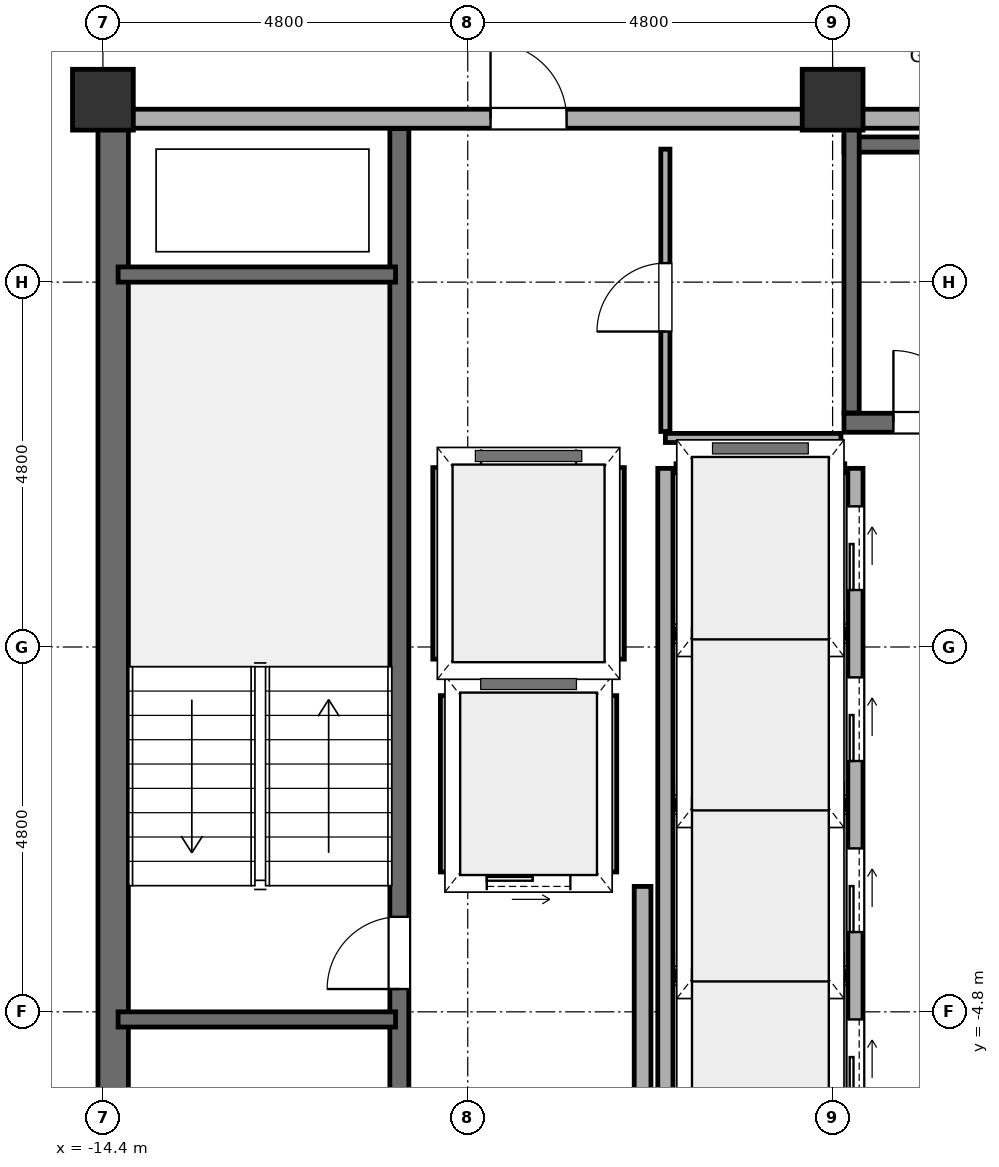
"""IFC4 building model, lengths in metres.
Left out: names, types, materials, properties, quantities, classifications, styles, units other than length and angle.
Written with IfcOpenShell. Run it as: python <this file> out.ifc"""

import sys

from ifc_helpers import new_model, si_unit, direction, frame, frame_2d, origin, origin_2d, place, context, subcontext, project, spatial, rectangle, hollow_rectangle, extrude, element, fill, save


model = new_model("IFC4")
c1 = context("Model", 3, precision=1e-05, world=origin(), true_north=direction((0.0, 1.0)))
c2 = subcontext(c1, "Body", "Model", "MODEL_VIEW")
j1 = project(units=[si_unit("LENGTHUNIT", "METRE"), si_unit("PLANEANGLEUNIT", "RADIAN")], contexts=[c1])
p1 = place(None, origin())
s1 = spatial("IfcSite", under=j1, at=p1, CompositionType="ELEMENT")
p2 = place(p1, origin())
s2 = spatial("IfcBuilding", under=s1, at=p2, CompositionType="ELEMENT")
p3 = place(p2, frame((0.0, 0.0, 30.0)))
s3 = spatial("IfcBuildingStorey", under=s2, at=p3, CompositionType="ELEMENT", Elevation=30.0)
for number, where, z_axis, x_axis in (
    (1, (-14.4, 7.2, 0.0), (0.0, 0.0, 1.0), (1.0, 0.0, 0.0)),
    (2, (-4.8, 7.2, 0.0), (0.0, 0.0, 1.0), (1.0, 0.0, 0.0)),
):
    element("IfcColumn", number, at=place(p3, frame(where, z_axis=z_axis, x_axis=x_axis)), inside=s3, PredefinedType="COLUMN", context=c2, shape_type="SweptSolid", body=[
        extrude(hollow_rectangle(XDim=0.8, YDim=0.8, WallThickness=0.036, at=origin_2d()), origin(), (0.0, 0.0, 1.0), 3.7),
    ])
p4 = place(p3, frame((-14.265, -7.2, -0.18), z_axis=(0.0, 0.0, 1.0), x_axis=(0.0, 1.0, 0.0)))
e3 = element("IfcWall", 3, at=p4, inside=s3, PredefinedType="SHEAR", context=c2, shape_type="SweptSolid", body=[
    extrude(rectangle(XDim=14.4, YDim=0.4, at=frame_2d((7.2, 0.0))), origin(), (0.0, 0.0, 1.0), 3.7),
])
p5 = place(p3, frame((-14.2, 6.95, 0.0), z_axis=(0.0, 0.0, 1.0), x_axis=(1.0, 0.0, 0.0)))
e4 = element("IfcWall", 4, at=p5, inside=s3, PredefinedType="SOLIDWALL", context=c2, shape_type="SweptSolid", body=[
    extrude(rectangle(XDim=9.4, YDim=0.25, at=frame_2d((4.7, 0.0))), origin(), (0.0, 0.0, 1.0), 2.12),
])
p6 = place(p5, frame((4.9, 0.0, 0.0)))
e5 = element("IfcOpeningElement", 5, at=p6, cuts=e4, PredefinedType="OPENING", context=c2, shape_type="SweptSolid", body=[
    extrude(rectangle(XDim=1.0, YDim=2.02, at=frame_2d((0.5, 1.01))), frame((0.0, 0.14, 0.0), z_axis=(0.0, -1.0, 0.0), x_axis=(1.0, 0.0, 0.0)), (0.0, 0.0, 1.0), 0.28),
])
p7 = place(p3, frame((-4.6, 6.95, 0.0), z_axis=(0.0, 0.0, 1.0), x_axis=(1.0, 0.0, 0.0)))
e6 = element("IfcWall", 6, at=p7, inside=s3, PredefinedType="SOLIDWALL", context=c2, shape_type="SweptSolid", body=[
    extrude(rectangle(XDim=9.2, YDim=0.25, at=frame_2d((4.6, 0.0))), origin(), (0.0, 0.0, 1.0), 2.12),
])
p8 = place(p3, frame((-7.3, -6.82, 0.0), z_axis=(0.0, 0.0, 1.0), x_axis=(0.0, 1.0, 0.0)))
e7 = element("IfcWall", 7, at=p8, inside=s3, PredefinedType="SOLIDWALL", context=c2, shape_type="SweptSolid", body=[
    extrude(rectangle(XDim=3.67, YDim=0.22, at=frame_2d((1.835, 0.0))), origin(), (0.0, 0.0, 1.0), 2.12),
])
p9 = place(p3, frame((-10.5, -6.82, -0.18), z_axis=(0.0, 0.0, 1.0), x_axis=(0.0, 1.0, 0.0)))
e8 = element("IfcWall", 8, at=p9, inside=s3, PredefinedType="SOLIDWALL", context=c2, shape_type="SweptSolid", body=[
    extrude(rectangle(XDim=13.64, YDim=0.25, at=frame_2d((6.82, 0.0))), origin(), (0.0, 0.0, 1.0), 3.7),
])
p10 = place(p9, frame((2.32, 0.0, 0.18)))
e9 = element("IfcOpeningElement", 9, at=p10, cuts=e8, PredefinedType="OPENING", context=c2, shape_type="SweptSolid", body=[
    extrude(rectangle(XDim=0.95, YDim=2.15, at=frame_2d((0.475, 1.075))), frame((0.0, 0.14, 0.0), z_axis=(0.0, -1.0, 0.0), x_axis=(1.0, 0.0, 0.0)), (0.0, 0.0, 1.0), 0.28),
])
for number, where, z_axis, x_axis in (
    (10, (-14.2, -4.9, -0.18), (0.0, 0.0, 1.0), (1.0, 0.0, 0.0)),
    (11, (-14.2, 4.9, -0.18), (0.0, 0.0, 1.0), (1.0, 0.0, 0.0)),
):
    element("IfcWall", number, at=place(p3, frame(where, z_axis=z_axis, x_axis=x_axis)), inside=s3, PredefinedType="SOLIDWALL", context=c2, shape_type="SweptSolid", body=[
        extrude(rectangle(XDim=3.65, YDim=0.2, at=frame_2d((1.825, 0.0))), origin(), (0.0, 0.0, 1.0), 3.7),
    ])
p11 = place(p3, frame((-4.65, 2.95, -0.18), z_axis=(0.0, 0.0, 1.0), x_axis=(1.0, 0.0, 0.0)))
e12 = element("IfcWall", 12, at=p11, inside=s3, PredefinedType="SOLIDWALL", context=c2, shape_type="SweptSolid", body=[
    extrude(rectangle(XDim=9.9, YDim=0.25, at=frame_2d((4.95, 0.0))), origin(), (0.0, 0.0, 1.0), 3.7),
])
p12 = place(p11, frame((0.65, 0.0, 0.18)))
e13 = element("IfcOpeningElement", 13, at=p12, cuts=e12, PredefinedType="OPENING", context=c2, shape_type="SweptSolid", body=[
    extrude(rectangle(XDim=0.95, YDim=2.15, at=frame_2d((0.475, 1.075))), frame((0.0, 0.14, 0.0), z_axis=(0.0, -1.0, 0.0), x_axis=(1.0, 0.0, 0.0)), (0.0, 0.0, 1.0), 0.28),
])
p13 = place(p3, frame((-4.65, 6.61, -0.18), z_axis=(0.0, 0.0, 1.0), x_axis=(1.0, 0.0, 0.0)))
e14 = element("IfcWall", 14, at=p13, inside=s3, PredefinedType="SOLIDWALL", context=c2, shape_type="SweptSolid", body=[
    extrude(rectangle(XDim=9.9, YDim=0.2, at=frame_2d((4.95, 0.0))), origin(), (0.0, 0.0, 1.0), 3.7),
])
p14 = place(p3, frame((-4.55, 3.08, -0.18), z_axis=(0.0, 0.0, 1.0), x_axis=(0.0, 1.0, 0.0)))
e15 = element("IfcWall", 15, at=p14, inside=s3, PredefinedType="SOLIDWALL", context=c2, shape_type="SweptSolid", body=[
    extrude(rectangle(XDim=3.74, YDim=0.2, at=frame_2d((1.87, 0.0))), origin(), (0.0, 0.0, 1.0), 3.7),
])
p15 = place(p3, frame((-4.5, -6.5, 0.0), z_axis=(0.0, 0.0, 1.0), x_axis=(0.0, 1.0, 0.0)))
e16 = element("IfcWall", 16, at=p15, inside=s3, PredefinedType="SOLIDWALL", context=c2, shape_type="SweptSolid", body=[
    extrude(rectangle(XDim=8.85, YDim=0.2, at=frame_2d((4.425, 0.0))), origin(), (0.0, 0.0, 1.0), 3.52),
])
p16 = place(p15, frame((0.5, 0.0, 0.0)))
e17 = element("IfcOpeningElement", 17, at=p16, cuts=e16, PredefinedType="OPENING", context=c2, shape_type="SweptSolid", body=[
    extrude(rectangle(XDim=1.1, YDim=2.2, at=frame_2d((0.55, 1.1))), frame((0.0, 0.115, 0.0), z_axis=(0.0, -1.0, 0.0), x_axis=(1.0, 0.0, 0.0)), (0.0, 0.0, 1.0), 0.23),
])
p17 = place(p15, frame((2.75, 0.0, 0.0)))
e18 = element("IfcOpeningElement", 18, at=p17, cuts=e16, PredefinedType="OPENING", context=c2, shape_type="SweptSolid", body=[
    extrude(rectangle(XDim=1.1, YDim=2.2, at=frame_2d((0.55, 1.1))), frame((0.0, 0.115, 0.0), z_axis=(0.0, -1.0, 0.0), x_axis=(1.0, 0.0, 0.0)), (0.0, 0.0, 1.0), 0.23),
])
p18 = place(p15, frame((5.0, 0.0, 0.0)))
e19 = element("IfcOpeningElement", 19, at=p18, cuts=e16, PredefinedType="OPENING", context=c2, shape_type="SweptSolid", body=[
    extrude(rectangle(XDim=1.1, YDim=2.2, at=frame_2d((0.55, 1.1))), frame((0.0, 0.115, 0.0), z_axis=(0.0, -1.0, 0.0), x_axis=(1.0, 0.0, 0.0)), (0.0, 0.0, 1.0), 0.23),
])
p19 = place(p15, frame((7.25, 0.0, 0.0)))
e20 = element("IfcOpeningElement", 20, at=p19, cuts=e16, PredefinedType="OPENING", context=c2, shape_type="SweptSolid", body=[
    extrude(rectangle(XDim=1.1, YDim=2.2, at=frame_2d((0.55, 1.1))), frame((0.0, 0.115, 0.0), z_axis=(0.0, -1.0, 0.0), x_axis=(1.0, 0.0, 0.0)), (0.0, 0.0, 1.0), 0.23),
])
p20 = place(p3, frame((-7.0, -6.5, 0.0), z_axis=(0.0, 0.0, 1.0), x_axis=(0.0, 1.0, 0.0)))
e21 = element("IfcWall", 21, at=p20, inside=s3, PredefinedType="SOLIDWALL", context=c2, shape_type="SweptSolid", body=[
    extrude(rectangle(XDim=8.85, YDim=0.2, at=frame_2d((4.425, 0.0))), origin(), (0.0, 0.0, 1.0), 3.52),
])
for number, where, z_axis, x_axis in (
    (22, (-6.86, -4.325, 0.0), (0.0, 0.0, 1.0), (1.0, 0.0, 0.0)),
    (23, (-6.86, -2.075, 0.0), (0.0, 0.0, 1.0), (1.0, 0.0, 0.0)),
    (24, (-6.86, 0.175, 0.0), (0.0, 0.0, 1.0), (1.0, 0.0, 0.0)),
    (25, (-6.86, 2.35, 0.0), (0.0, 0.0, 1.0), (1.0, 0.0, 0.0)),
):
    element("IfcWall", number, at=place(p3, frame(where, z_axis=z_axis, x_axis=x_axis)), inside=s3, PredefinedType="PARTITIONING", context=c2, shape_type="SweptSolid", body=[
        extrude(rectangle(XDim=2.22, YDim=0.12, at=frame_2d((1.11, 0.0))), origin(), (0.0, 0.0, 1.0), 3.52),
    ])
p21 = place(p3, frame((-9.82, -3.1, 0.0), z_axis=(0.0, 0.0, 1.0), x_axis=(1.0, 0.0, 0.0)))
e26 = element("IfcWall", 26, at=p21, inside=s3, PredefinedType="SOLIDWALL", context=c2, shape_type="SweptSolid", body=[
    extrude(rectangle(XDim=2.04, YDim=0.2, at=frame_2d((1.02, 0.0))), origin(), (0.0, 0.0, 1.0), 3.52),
])
p22 = place(p21, frame((0.47, 0.0, 0.0)))
e27 = element("IfcOpeningElement", 27, at=p22, cuts=e26, PredefinedType="OPENING", context=c2, shape_type="SweptSolid", body=[
    extrude(rectangle(XDim=1.1, YDim=2.2, at=frame_2d((0.55, 1.1))), frame((0.0, 0.115, 0.0), z_axis=(0.0, -1.0, 0.0), x_axis=(1.0, 0.0, 0.0)), (0.0, 0.0, 1.0), 0.23),
])
p23 = place(p3, frame((-9.82, -0.5, 0.0), z_axis=(0.0, 0.0, 1.0), x_axis=(1.0, 0.0, 0.0)))
e28 = element("IfcWall", 28, at=p23, inside=s3, PredefinedType="SOLIDWALL", context=c2, shape_type="SweptSolid", body=[
    extrude(rectangle(XDim=2.04, YDim=0.2, at=frame_2d((1.02, 0.0))), origin(), (0.0, 0.0, 1.0), 3.52),
])
for number, where, z_axis, x_axis in (
    (29, (-9.9, -2.96, 0.0), (0.0, 0.0, 1.0), (0.0, 1.0, 0.0)),
    (30, (-7.7, -2.96, 0.0), (0.0, 0.0, 1.0), (0.0, 1.0, 0.0)),
):
    element("IfcWall", number, at=place(p3, frame(where, z_axis=z_axis, x_axis=x_axis)), inside=s3, PredefinedType="PARTITIONING", context=c2, shape_type="SweptSolid", body=[
        extrude(rectangle(XDim=2.32, YDim=0.12, at=frame_2d((1.16, 0.0))), origin(), (0.0, 0.0, 1.0), 3.52),
    ])
p24 = place(p3, frame((-9.92, 2.5, 0.0), z_axis=(0.0, 0.0, 1.0), x_axis=(1.0, 0.0, 0.0)))
e31 = element("IfcWall", 31, at=p24, inside=s3, PredefinedType="SOLIDWALL", context=c2, shape_type="SweptSolid", body=[
    extrude(rectangle(XDim=2.24, YDim=0.2, at=frame_2d((1.12, 0.0))), origin(), (0.0, 0.0, 1.0), 3.52),
])
p25 = place(p24, frame((0.495, 0.0, 0.0)))
e32 = element("IfcOpeningElement", 32, at=p25, cuts=e31, PredefinedType="OPENING", context=c2, shape_type="SweptSolid", body=[
    extrude(rectangle(XDim=1.25, YDim=2.25, at=frame_2d((0.625, 1.125))), frame((0.0, 0.115, 0.0), z_axis=(0.0, -1.0, 0.0), x_axis=(1.0, 0.0, 0.0)), (0.0, 0.0, 1.0), 0.23),
])
p26 = place(p3, frame((-9.92, -0.3, 0.0), z_axis=(0.0, 0.0, 1.0), x_axis=(1.0, 0.0, 0.0)))
e33 = element("IfcWall", 33, at=p26, inside=s3, PredefinedType="SOLIDWALL", context=c2, shape_type="SweptSolid", body=[
    extrude(rectangle(XDim=2.24, YDim=0.2, at=frame_2d((1.12, 0.0))), origin(), (0.0, 0.0, 1.0), 3.52),
])
for number, where, z_axis, x_axis in (
    (34, (-10.0, -0.16, 0.0), (0.0, 0.0, 1.0), (0.0, 1.0, 0.0)),
    (35, (-7.6, -0.16, 0.0), (0.0, 0.0, 1.0), (0.0, 1.0, 0.0)),
):
    element("IfcWall", number, at=place(p3, frame(where, z_axis=z_axis, x_axis=x_axis)), inside=s3, PredefinedType="PARTITIONING", context=c2, shape_type="SweptSolid", body=[
        extrude(rectangle(XDim=2.52, YDim=0.12, at=frame_2d((1.26, 0.0))), origin(), (0.0, 0.0, 1.0), 3.52),
    ])
p27 = place(p3, frame((-7.0, 2.75, 0.0), z_axis=(0.0, 0.0, 1.0), x_axis=(1.0, 0.0, 0.0)))
e36 = element("IfcWall", 36, at=p27, inside=s3, PredefinedType="PARTITIONING", context=c2, shape_type="SweptSolid", body=[
    extrude(rectangle(XDim=2.31, YDim=0.12, at=frame_2d((1.155, 0.0))), origin(), (0.0, 0.0, 1.0), 3.52),
])
p28 = place(p3, frame((-7.0, 2.835, 0.0), z_axis=(0.0, 0.0, 1.0), x_axis=(0.0, 1.0, 0.0)))
e37 = element("IfcWall", 37, at=p28, inside=s3, PredefinedType="PARTITIONING", context=c2, shape_type="SweptSolid", body=[
    extrude(rectangle(XDim=3.715, YDim=0.12, at=frame_2d((1.857, 0.0))), origin(), (0.0, 0.0, 1.0), 3.52),
])
p29 = place(p28, frame((1.315, 0.0, 0.0)))
e38 = element("IfcOpeningElement", 38, at=p29, cuts=e37, PredefinedType="OPENING", context=c2, shape_type="SweptSolid", body=[
    extrude(rectangle(XDim=0.9, YDim=2.1, at=frame_2d((0.45, 1.05))), frame((0.0, 0.075, 0.0), z_axis=(0.0, -1.0, 0.0), x_axis=(1.0, 0.0, 0.0)), (0.0, 0.0, 1.0), 0.15),
])
p30 = place(p6, origin())
e39 = element("IfcDoor", 39, at=p30, inside=s3, OperationType="SINGLE_SWING_RIGHT", PredefinedType="DOOR", context=c2, shape_type="SweptSolid", body=[
    extrude(rectangle(XDim=1.0, YDim=2.02, at=frame_2d((0.5, 1.01))), frame((0.0, 0.025, 0.0), z_axis=(0.0, -1.0, 0.0), x_axis=(1.0, 0.0, 0.0)), (0.0, 0.0, 1.0), 0.05),
])
fill(e5, e39)
p31 = place(p10, origin())
e40 = element("IfcDoor", 40, at=p31, inside=s3, OperationType="SINGLE_SWING_RIGHT", PredefinedType="DOOR", context=c2, shape_type="SweptSolid", body=[
    extrude(rectangle(XDim=0.95, YDim=2.15, at=frame_2d((0.475, 1.075))), frame((0.0, 0.025, 0.0), z_axis=(0.0, -1.0, 0.0), x_axis=(1.0, 0.0, 0.0)), (0.0, 0.0, 1.0), 0.05),
])
fill(e9, e40)
p32 = place(p12, origin())
e41 = element("IfcDoor", 41, at=p32, inside=s3, OperationType="SINGLE_SWING_LEFT", PredefinedType="DOOR", context=c2, shape_type="SweptSolid", body=[
    extrude(rectangle(XDim=0.95, YDim=2.15, at=frame_2d((0.475, 1.075))), frame((0.0, 0.025, 0.0), z_axis=(0.0, -1.0, 0.0), x_axis=(1.0, 0.0, 0.0)), (0.0, 0.0, 1.0), 0.05),
])
fill(e13, e41)
p33 = place(p16, origin())
e42 = element("IfcDoor", 42, at=p33, inside=s3, OperationType="SLIDING_TO_LEFT", PredefinedType="DOOR", context=c2, shape_type="SweptSolid", body=[
    extrude(rectangle(XDim=1.1, YDim=2.2, at=frame_2d((0.55, 1.1))), frame((0.0, 0.025, 0.0), z_axis=(0.0, -1.0, 0.0), x_axis=(1.0, 0.0, 0.0)), (0.0, 0.0, 1.0), 0.05),
])
fill(e17, e42)
p34 = place(p17, origin())
e43 = element("IfcDoor", 43, at=p34, inside=s3, OperationType="SLIDING_TO_LEFT", PredefinedType="DOOR", context=c2, shape_type="SweptSolid", body=[
    extrude(rectangle(XDim=1.1, YDim=2.2, at=frame_2d((0.55, 1.1))), frame((0.0, 0.025, 0.0), z_axis=(0.0, -1.0, 0.0), x_axis=(1.0, 0.0, 0.0)), (0.0, 0.0, 1.0), 0.05),
])
fill(e18, e43)
p35 = place(p18, origin())
e44 = element("IfcDoor", 44, at=p35, inside=s3, OperationType="SLIDING_TO_LEFT", PredefinedType="DOOR", context=c2, shape_type="SweptSolid", body=[
    extrude(rectangle(XDim=1.1, YDim=2.2, at=frame_2d((0.55, 1.1))), frame((0.0, 0.025, 0.0), z_axis=(0.0, -1.0, 0.0), x_axis=(1.0, 0.0, 0.0)), (0.0, 0.0, 1.0), 0.05),
])
fill(e19, e44)
p36 = place(p19, origin())
e45 = element("IfcDoor", 45, at=p36, inside=s3, OperationType="SLIDING_TO_LEFT", PredefinedType="DOOR", context=c2, shape_type="SweptSolid", body=[
    extrude(rectangle(XDim=1.1, YDim=2.2, at=frame_2d((0.55, 1.1))), frame((0.0, 0.025, 0.0), z_axis=(0.0, -1.0, 0.0), x_axis=(1.0, 0.0, 0.0)), (0.0, 0.0, 1.0), 0.05),
])
fill(e20, e45)
p37 = place(p22, origin())
e46 = element("IfcDoor", 46, at=p37, inside=s3, OperationType="SLIDING_TO_LEFT", PredefinedType="DOOR", context=c2, shape_type="SweptSolid", body=[
    extrude(rectangle(XDim=1.1, YDim=2.2, at=frame_2d((0.55, 1.1))), frame((0.0, 0.025, 0.0), z_axis=(0.0, -1.0, 0.0), x_axis=(1.0, 0.0, 0.0)), (0.0, 0.0, 1.0), 0.05),
])
fill(e27, e46)
p38 = place(p25, origin())
e47 = element("IfcDoor", 47, at=p38, inside=s3, OperationType="SLIDING_TO_LEFT", PredefinedType="DOOR", context=c2, shape_type="SweptSolid", body=[
    extrude(rectangle(XDim=1.25, YDim=2.25, at=frame_2d((0.625, 1.125))), frame((0.0, 0.025, 0.0), z_axis=(0.0, -1.0, 0.0), x_axis=(1.0, 0.0, 0.0)), (0.0, 0.0, 1.0), 0.05),
])
fill(e32, e47)
p39 = place(p29, origin())
e48 = element("IfcDoor", 48, at=p39, inside=s3, OperationType="SINGLE_SWING_RIGHT", PredefinedType="DOOR", context=c2, shape_type="SweptSolid", body=[
    extrude(rectangle(XDim=0.9, YDim=2.1, at=frame_2d((0.45, 1.05))), frame((0.0, 0.025, 0.0), z_axis=(0.0, -1.0, 0.0), x_axis=(1.0, 0.0, 0.0)), (0.0, 0.0, 1.0), 0.05),
])
fill(e38, e48)
save(model, sys.argv[1])
